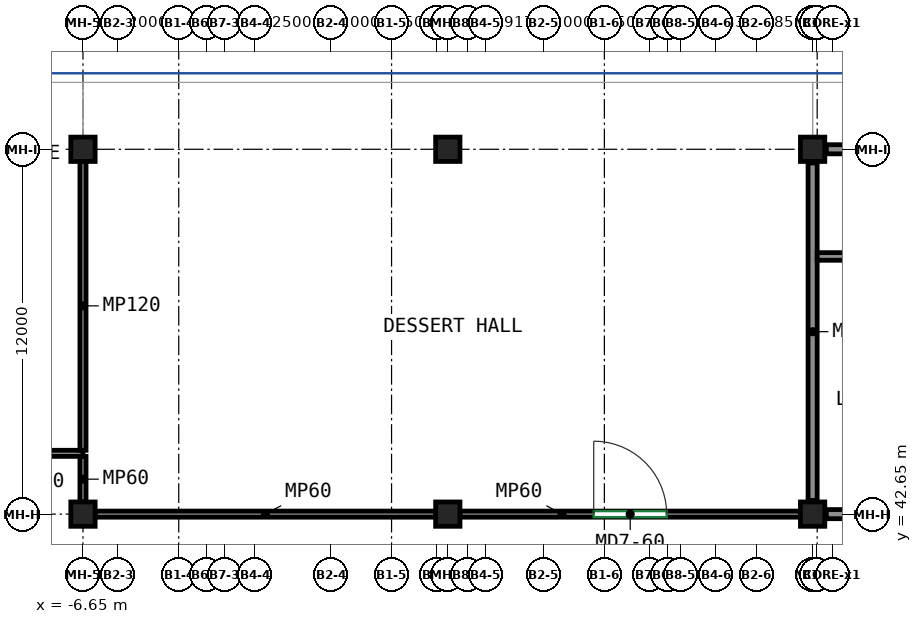
"""IFC4 building model, lengths in metres.
Left out: names, types, materials, properties, quantities, classifications, styles, units other than length and angle.
Written with IfcOpenShell. Run it as: python <this file> out.ifc"""

import sys

from ifc_helpers import new_model, si_unit, direction, frame, frame_2d, origin, origin_2d, place, context, subcontext, project, spatial, rectangle, extrude, source, transform, mapped, element, fill, save


model = new_model("IFC4")
c1 = context("Model", 3, precision=1e-05, world=origin(), true_north=direction((0.0, 1.0)))
c2 = subcontext(c1, "Body", "Model", "MODEL_VIEW")
j1 = project(units=[si_unit("LENGTHUNIT", "METRE"), si_unit("PLANEANGLEUNIT", "RADIAN")], contexts=[c1])
p1 = place(None, origin())
s1 = spatial("IfcSite", under=j1, at=p1, CompositionType="ELEMENT")
p2 = place(p1, origin())
s2 = spatial("IfcBuilding", under=s1, at=p2, CompositionType="ELEMENT")
p3 = place(p2, frame((0.0, 0.0, 9.0)))
s3 = spatial("IfcBuildingStorey", under=s2, at=p3, CompositionType="ELEMENT", Elevation=9.0)
m1 = source(origin(), c2, "Body", "SweptSolid", [
    extrude(rectangle(XDim=0.8, YDim=0.8, at=origin_2d()), origin(), (0.0, 0.0, 1.0), 4.1),
])
for number, where, z_axis, x_axis in (
    (1, (-6.65, 42.65, 0.0), (0.0, 0.0, 1.0), (1.0, 0.0, 0.0)),
    (2, (-6.65, 54.65, 0.0), (0.0, 0.0, 1.0), (1.0, 0.0, 0.0)),
    (3, (5.35, 42.65, 0.0), (0.0, 0.0, 1.0), (1.0, 0.0, 0.0)),
    (4, (5.35, 54.65, 0.0), (0.0, 0.0, 1.0), (1.0, 0.0, 0.0)),
    (5, (17.35, 42.65, 0.0), (0.0, 0.0, 1.0), (1.0, 0.0, 0.0)),
    (6, (17.35, 54.65, 0.0), (0.0, 0.0, 1.0), (1.0, 0.0, 0.0)),
):
    element("IfcColumn", number, at=place(p3, frame(where, z_axis=z_axis, x_axis=x_axis)), inside=s3, PredefinedType="COLUMN", context=c2, shape_type="MappedRepresentation", body=[
        mapped(m1, transform((0.0, 0.0, 0.0))),
    ])
m2 = source(origin(), c2, "Body", "SweptSolid", [
    extrude(rectangle(XDim=12.4, YDim=0.3, at=frame_2d((6.2, 0.0))), origin(), (0.0, 0.0, 1.0), 3.2),
])
p4 = place(p3, frame((30.2, 54.65, 0.0), z_axis=(0.0, 0.0, 1.0), x_axis=(-1.0, 0.0, 0.0)))
e7 = element("IfcWall", 7, at=p4, inside=s3, PredefinedType="SHEAR", context=c2, shape_type="MappedRepresentation", body=[
    mapped(m2, transform((0.0, 0.0, 0.0))),
])
p5 = place(p4, frame((5.7, 0.0, 0.0)))
e8 = element("IfcOpeningElement", 8, at=p5, cuts=e7, PredefinedType="OPENING", context=c2, shape_type="SweptSolid", body=[
    extrude(rectangle(XDim=1.0, YDim=2.1, at=frame_2d((0.5, 1.05))), frame((0.0, 0.16, 0.0), z_axis=(0.0, -1.0, 0.0), x_axis=(1.0, 0.0, 0.0)), (0.0, 0.0, 1.0), 0.32),
])
p6 = place(p3, frame((30.2, 42.65, 0.0), z_axis=(0.0, 0.0, 1.0), x_axis=(-1.0, 0.0, 0.0)))
e9 = element("IfcWall", 9, at=p6, inside=s3, PredefinedType="SHEAR", context=c2, shape_type="MappedRepresentation", body=[
    mapped(m2, transform((0.0, 0.0, 0.0))),
])
p7 = place(p6, frame((5.2, 0.0, 0.0)))
e10 = element("IfcOpeningElement", 10, at=p7, cuts=e9, PredefinedType="OPENING", context=c2, shape_type="SweptSolid", body=[
    extrude(rectangle(XDim=2.0, YDim=2.4, at=frame_2d((1.0, 1.2))), frame((0.0, 0.16, 0.0), z_axis=(0.0, -1.0, 0.0), x_axis=(1.0, 0.0, 0.0)), (0.0, 0.0, 1.0), 0.32),
])
m3 = source(origin(), c2, "Body", "SweptSolid", [
    extrude(rectangle(XDim=11.1, YDim=0.3, at=frame_2d((5.55, 0.0))), origin(), (0.0, 0.0, 1.0), 3.2),
])
p8 = place(p3, frame((17.35, 54.2, 0.0), z_axis=(0.0, 0.0, 1.0), x_axis=(0.0, -1.0, 0.0)))
e11 = element("IfcWall", 11, at=p8, inside=s3, PredefinedType="SHEAR", context=c2, shape_type="MappedRepresentation", body=[
    mapped(m3, transform((0.0, 0.0, 0.0))),
])
m4 = source(origin(), c2, "Body", "SweptSolid", [
    extrude(rectangle(XDim=4.15, YDim=0.25, at=frame_2d((2.075, 0.0))), origin(), (0.0, 0.0, 1.0), 4.1),
])
p9 = place(p3, frame((21.65, 51.125, 0.0), z_axis=(0.0, 0.0, 1.0), x_axis=(-1.0, 0.0, 0.0)))
e12 = element("IfcWall", 12, at=p9, inside=s3, PredefinedType="SHEAR", context=c2, shape_type="MappedRepresentation", body=[
    mapped(m4, transform((0.0, 0.0, 0.0))),
])
p10 = place(p9, frame((1.4, 0.0, 0.0)))
e13 = element("IfcOpeningElement", 13, at=p10, cuts=e12, PredefinedType="OPENING", context=c2, shape_type="SweptSolid", body=[
    extrude(rectangle(XDim=1.1, YDim=2.1, at=frame_2d((0.55, 1.05))), frame((0.0, 0.135, 0.0), z_axis=(0.0, -1.0, 0.0), x_axis=(1.0, 0.0, 0.0)), (0.0, 0.0, 1.0), 0.27),
])
m5 = source(origin(), c2, "Body", "SweptSolid", [
    extrude(rectangle(XDim=112.7, YDim=0.3, at=frame_2d((56.35, 0.0))), origin(), (0.0, 0.0, 1.0), 4.1),
])
p11 = place(p3, frame((-56.85, 57.0, 0.0), z_axis=(0.0, 0.0, 1.0), x_axis=(1.0, 0.0, 0.0)))
e14 = element("IfcWall", 14, at=p11, inside=s3, PredefinedType="SOLIDWALL", context=c2, shape_type="MappedRepresentation", body=[
    mapped(m5, transform((0.0, 0.0, 0.0))),
])
p12 = place(p11, frame((3.15, 0.0, 0.9)))
e15 = element("IfcOpeningElement", 15, at=p12, cuts=e14, PredefinedType="OPENING", context=c2, shape_type="SweptSolid", body=[
    extrude(rectangle(XDim=2.4, YDim=1.8, at=frame_2d((1.2, 0.9))), frame((0.0, 0.16, 0.0), z_axis=(0.0, -1.0, 0.0), x_axis=(1.0, 0.0, 0.0)), (0.0, 0.0, 1.0), 0.32),
])
p13 = place(p11, frame((7.15, 0.0, 0.9)))
e16 = element("IfcOpeningElement", 16, at=p13, cuts=e14, PredefinedType="OPENING", context=c2, shape_type="SweptSolid", body=[
    extrude(rectangle(XDim=2.4, YDim=1.8, at=frame_2d((1.2, 0.9))), frame((0.0, 0.16, 0.0), z_axis=(0.0, -1.0, 0.0), x_axis=(1.0, 0.0, 0.0)), (0.0, 0.0, 1.0), 0.32),
])
p14 = place(p11, frame((11.15, 0.0, 0.9)))
e17 = element("IfcOpeningElement", 17, at=p14, cuts=e14, PredefinedType="OPENING", context=c2, shape_type="SweptSolid", body=[
    extrude(rectangle(XDim=2.4, YDim=1.8, at=frame_2d((1.2, 0.9))), frame((0.0, 0.16, 0.0), z_axis=(0.0, -1.0, 0.0), x_axis=(1.0, 0.0, 0.0)), (0.0, 0.0, 1.0), 0.32),
])
p15 = place(p11, frame((15.15, 0.0, 0.9)))
e18 = element("IfcOpeningElement", 18, at=p15, cuts=e14, PredefinedType="OPENING", context=c2, shape_type="SweptSolid", body=[
    extrude(rectangle(XDim=2.4, YDim=1.8, at=frame_2d((1.2, 0.9))), frame((0.0, 0.16, 0.0), z_axis=(0.0, -1.0, 0.0), x_axis=(1.0, 0.0, 0.0)), (0.0, 0.0, 1.0), 0.32),
])
p16 = place(p11, frame((19.15, 0.0, 0.9)))
e19 = element("IfcOpeningElement", 19, at=p16, cuts=e14, PredefinedType="OPENING", context=c2, shape_type="SweptSolid", body=[
    extrude(rectangle(XDim=2.4, YDim=1.8, at=frame_2d((1.2, 0.9))), frame((0.0, 0.16, 0.0), z_axis=(0.0, -1.0, 0.0), x_axis=(1.0, 0.0, 0.0)), (0.0, 0.0, 1.0), 0.32),
])
p17 = place(p11, frame((23.15, 0.0, 0.9)))
e20 = element("IfcOpeningElement", 20, at=p17, cuts=e14, PredefinedType="OPENING", context=c2, shape_type="SweptSolid", body=[
    extrude(rectangle(XDim=2.4, YDim=1.8, at=frame_2d((1.2, 0.9))), frame((0.0, 0.16, 0.0), z_axis=(0.0, -1.0, 0.0), x_axis=(1.0, 0.0, 0.0)), (0.0, 0.0, 1.0), 0.32),
])
p18 = place(p11, frame((27.15, 0.0, 0.9)))
e21 = element("IfcOpeningElement", 21, at=p18, cuts=e14, PredefinedType="OPENING", context=c2, shape_type="SweptSolid", body=[
    extrude(rectangle(XDim=2.4, YDim=1.8, at=frame_2d((1.2, 0.9))), frame((0.0, 0.16, 0.0), z_axis=(0.0, -1.0, 0.0), x_axis=(1.0, 0.0, 0.0)), (0.0, 0.0, 1.0), 0.32),
])
p19 = place(p11, frame((31.15, 0.0, 0.9)))
e22 = element("IfcOpeningElement", 22, at=p19, cuts=e14, PredefinedType="OPENING", context=c2, shape_type="SweptSolid", body=[
    extrude(rectangle(XDim=2.4, YDim=1.8, at=frame_2d((1.2, 0.9))), frame((0.0, 0.16, 0.0), z_axis=(0.0, -1.0, 0.0), x_axis=(1.0, 0.0, 0.0)), (0.0, 0.0, 1.0), 0.32),
])
p20 = place(p11, frame((35.15, 0.0, 0.9)))
e23 = element("IfcOpeningElement", 23, at=p20, cuts=e14, PredefinedType="OPENING", context=c2, shape_type="SweptSolid", body=[
    extrude(rectangle(XDim=2.4, YDim=1.8, at=frame_2d((1.2, 0.9))), frame((0.0, 0.16, 0.0), z_axis=(0.0, -1.0, 0.0), x_axis=(1.0, 0.0, 0.0)), (0.0, 0.0, 1.0), 0.32),
])
p21 = place(p11, frame((43.15, 0.0, 0.9)))
e24 = element("IfcOpeningElement", 24, at=p21, cuts=e14, PredefinedType="OPENING", context=c2, shape_type="SweptSolid", body=[
    extrude(rectangle(XDim=2.4, YDim=1.8, at=frame_2d((1.2, 0.9))), frame((0.0, 0.16, 0.0), z_axis=(0.0, -1.0, 0.0), x_axis=(1.0, 0.0, 0.0)), (0.0, 0.0, 1.0), 0.32),
])
p22 = place(p11, frame((47.15, 0.0, 0.9)))
e25 = element("IfcOpeningElement", 25, at=p22, cuts=e14, PredefinedType="OPENING", context=c2, shape_type="SweptSolid", body=[
    extrude(rectangle(XDim=2.4, YDim=1.8, at=frame_2d((1.2, 0.9))), frame((0.0, 0.16, 0.0), z_axis=(0.0, -1.0, 0.0), x_axis=(1.0, 0.0, 0.0)), (0.0, 0.0, 1.0), 0.32),
])
p23 = place(p11, frame((51.15, 0.0, 0.9)))
e26 = element("IfcOpeningElement", 26, at=p23, cuts=e14, PredefinedType="OPENING", context=c2, shape_type="SweptSolid", body=[
    extrude(rectangle(XDim=2.4, YDim=1.8, at=frame_2d((1.2, 0.9))), frame((0.0, 0.16, 0.0), z_axis=(0.0, -1.0, 0.0), x_axis=(1.0, 0.0, 0.0)), (0.0, 0.0, 1.0), 0.32),
])
p24 = place(p11, frame((55.15, 0.0, 0.9)))
e27 = element("IfcOpeningElement", 27, at=p24, cuts=e14, PredefinedType="OPENING", context=c2, shape_type="SweptSolid", body=[
    extrude(rectangle(XDim=2.4, YDim=1.8, at=frame_2d((1.2, 0.9))), frame((0.0, 0.16, 0.0), z_axis=(0.0, -1.0, 0.0), x_axis=(1.0, 0.0, 0.0)), (0.0, 0.0, 1.0), 0.32),
])
p25 = place(p11, frame((59.15, 0.0, 0.9)))
e28 = element("IfcOpeningElement", 28, at=p25, cuts=e14, PredefinedType="OPENING", context=c2, shape_type="SweptSolid", body=[
    extrude(rectangle(XDim=2.4, YDim=1.8, at=frame_2d((1.2, 0.9))), frame((0.0, 0.16, 0.0), z_axis=(0.0, -1.0, 0.0), x_axis=(1.0, 0.0, 0.0)), (0.0, 0.0, 1.0), 0.32),
])
p26 = place(p11, frame((63.15, 0.0, 0.9)))
e29 = element("IfcOpeningElement", 29, at=p26, cuts=e14, PredefinedType="OPENING", context=c2, shape_type="SweptSolid", body=[
    extrude(rectangle(XDim=2.4, YDim=1.8, at=frame_2d((1.2, 0.9))), frame((0.0, 0.16, 0.0), z_axis=(0.0, -1.0, 0.0), x_axis=(1.0, 0.0, 0.0)), (0.0, 0.0, 1.0), 0.32),
])
p27 = place(p11, frame((67.15, 0.0, 0.9)))
e30 = element("IfcOpeningElement", 30, at=p27, cuts=e14, PredefinedType="OPENING", context=c2, shape_type="SweptSolid", body=[
    extrude(rectangle(XDim=2.4, YDim=1.8, at=frame_2d((1.2, 0.9))), frame((0.0, 0.16, 0.0), z_axis=(0.0, -1.0, 0.0), x_axis=(1.0, 0.0, 0.0)), (0.0, 0.0, 1.0), 0.32),
])
p28 = place(p11, frame((71.15, 0.0, 0.9)))
e31 = element("IfcOpeningElement", 31, at=p28, cuts=e14, PredefinedType="OPENING", context=c2, shape_type="SweptSolid", body=[
    extrude(rectangle(XDim=2.4, YDim=1.8, at=frame_2d((1.2, 0.9))), frame((0.0, 0.16, 0.0), z_axis=(0.0, -1.0, 0.0), x_axis=(1.0, 0.0, 0.0)), (0.0, 0.0, 1.0), 0.32),
])
p29 = place(p11, frame((75.15, 0.0, 0.9)))
e32 = element("IfcOpeningElement", 32, at=p29, cuts=e14, PredefinedType="OPENING", context=c2, shape_type="SweptSolid", body=[
    extrude(rectangle(XDim=2.4, YDim=1.8, at=frame_2d((1.2, 0.9))), frame((0.0, 0.16, 0.0), z_axis=(0.0, -1.0, 0.0), x_axis=(1.0, 0.0, 0.0)), (0.0, 0.0, 1.0), 0.32),
])
p30 = place(p11, frame((79.15, 0.0, 0.9)))
e33 = element("IfcOpeningElement", 33, at=p30, cuts=e14, PredefinedType="OPENING", context=c2, shape_type="SweptSolid", body=[
    extrude(rectangle(XDim=2.4, YDim=1.8, at=frame_2d((1.2, 0.9))), frame((0.0, 0.16, 0.0), z_axis=(0.0, -1.0, 0.0), x_axis=(1.0, 0.0, 0.0)), (0.0, 0.0, 1.0), 0.32),
])
p31 = place(p11, frame((83.15, 0.0, 0.9)))
e34 = element("IfcOpeningElement", 34, at=p31, cuts=e14, PredefinedType="OPENING", context=c2, shape_type="SweptSolid", body=[
    extrude(rectangle(XDim=2.4, YDim=1.8, at=frame_2d((1.2, 0.9))), frame((0.0, 0.16, 0.0), z_axis=(0.0, -1.0, 0.0), x_axis=(1.0, 0.0, 0.0)), (0.0, 0.0, 1.0), 0.32),
])
p32 = place(p11, frame((87.15, 0.0, 0.9)))
e35 = element("IfcOpeningElement", 35, at=p32, cuts=e14, PredefinedType="OPENING", context=c2, shape_type="SweptSolid", body=[
    extrude(rectangle(XDim=2.4, YDim=1.8, at=frame_2d((1.2, 0.9))), frame((0.0, 0.16, 0.0), z_axis=(0.0, -1.0, 0.0), x_axis=(1.0, 0.0, 0.0)), (0.0, 0.0, 1.0), 0.32),
])
p33 = place(p11, frame((91.15, 0.0, 0.9)))
e36 = element("IfcOpeningElement", 36, at=p33, cuts=e14, PredefinedType="OPENING", context=c2, shape_type="SweptSolid", body=[
    extrude(rectangle(XDim=2.4, YDim=1.8, at=frame_2d((1.2, 0.9))), frame((0.0, 0.16, 0.0), z_axis=(0.0, -1.0, 0.0), x_axis=(1.0, 0.0, 0.0)), (0.0, 0.0, 1.0), 0.32),
])
p34 = place(p11, frame((95.15, 0.0, 0.9)))
e37 = element("IfcOpeningElement", 37, at=p34, cuts=e14, PredefinedType="OPENING", context=c2, shape_type="SweptSolid", body=[
    extrude(rectangle(XDim=2.4, YDim=1.8, at=frame_2d((1.2, 0.9))), frame((0.0, 0.16, 0.0), z_axis=(0.0, -1.0, 0.0), x_axis=(1.0, 0.0, 0.0)), (0.0, 0.0, 1.0), 0.32),
])
p35 = place(p11, frame((103.15, 0.0, 0.9)))
e38 = element("IfcOpeningElement", 38, at=p35, cuts=e14, PredefinedType="OPENING", context=c2, shape_type="SweptSolid", body=[
    extrude(rectangle(XDim=2.4, YDim=1.8, at=frame_2d((1.2, 0.9))), frame((0.0, 0.16, 0.0), z_axis=(0.0, -1.0, 0.0), x_axis=(1.0, 0.0, 0.0)), (0.0, 0.0, 1.0), 0.32),
])
p36 = place(p11, frame((107.15, 0.0, 0.9)))
e39 = element("IfcOpeningElement", 39, at=p36, cuts=e14, PredefinedType="OPENING", context=c2, shape_type="SweptSolid", body=[
    extrude(rectangle(XDim=2.4, YDim=1.8, at=frame_2d((1.2, 0.9))), frame((0.0, 0.16, 0.0), z_axis=(0.0, -1.0, 0.0), x_axis=(1.0, 0.0, 0.0)), (0.0, 0.0, 1.0), 0.32),
])
m6 = source(origin(), c2, "Body", "SweptSolid", [
    extrude(rectangle(XDim=3.9, YDim=0.2, at=frame_2d((1.95, 0.0))), origin(), (0.0, 0.0, 1.0), 3.2),
])
p37 = place(p3, frame((-10.55, 44.65, 0.0), z_axis=(0.0, 0.0, 1.0), x_axis=(1.0, 0.0, 0.0)))
e40 = element("IfcWall", 40, at=p37, inside=s3, PredefinedType="PARTITIONING", context=c2, shape_type="MappedRepresentation", body=[
    mapped(m6, transform((0.0, 0.0, 0.0))),
])
p38 = place(p37, frame((1.35, 0.0, 0.0)))
e41 = element("IfcOpeningElement", 41, at=p38, cuts=e40, PredefinedType="OPENING", context=c2, shape_type="SweptSolid", body=[
    extrude(rectangle(XDim=1.2, YDim=2.1, at=frame_2d((0.6, 1.05))), frame((0.0, 0.11, 0.0), z_axis=(0.0, -1.0, 0.0), x_axis=(1.0, 0.0, 0.0)), (0.0, 0.0, 1.0), 0.22),
])
m7 = source(origin(), c2, "Body", "SweptSolid", [
    extrude(rectangle(XDim=1.5, YDim=0.2, at=frame_2d((0.75, 0.0))), origin(), (0.0, 0.0, 1.0), 3.2),
])
p39 = place(p3, frame((-6.65, 44.55, 0.0), z_axis=(0.0, 0.0, 1.0), x_axis=(0.0, -1.0, 0.0)))
e42 = element("IfcWall", 42, at=p39, inside=s3, PredefinedType="PARTITIONING", context=c2, shape_type="MappedRepresentation", body=[
    mapped(m7, transform((0.0, 0.0, 0.0))),
])
m8 = source(origin(), c2, "Body", "SweptSolid", [
    extrude(rectangle(XDim=9.5, YDim=0.2, at=frame_2d((4.75, 0.0))), origin(), (0.0, 0.0, 1.0), 3.2),
])
p40 = place(p3, frame((-6.65, 54.25, 0.0), z_axis=(0.0, 0.0, 1.0), x_axis=(0.0, -1.0, 0.0)))
e43 = element("IfcWall", 43, at=p40, inside=s3, PredefinedType="PARTITIONING", context=c2, shape_type="MappedRepresentation", body=[
    mapped(m8, transform((0.0, 0.0, 0.0))),
])
m9 = source(origin(), c2, "Body", "SweptSolid", [
    extrude(rectangle(XDim=1.8, YDim=0.2, at=frame_2d((0.9, 0.0))), origin(), (0.0, 0.0, 1.0), 4.1),
])
p41 = place(p3, frame((-6.65, 56.85, 0.0), z_axis=(0.0, 0.0, 1.0), x_axis=(0.0, -1.0, 0.0)))
e44 = element("IfcWall", 44, at=p41, inside=s3, PredefinedType="PARTITIONING", context=c2, shape_type="MappedRepresentation", body=[
    mapped(m9, transform((0.0, 0.0, 0.0))),
])
m10 = source(origin(), c2, "Body", "SweptSolid", [
    extrude(rectangle(XDim=11.2, YDim=0.2, at=frame_2d((5.6, 0.0))), origin(), (0.0, 0.0, 1.0), 3.2),
])
p42 = place(p3, frame((-6.25, 42.65, 0.0), z_axis=(0.0, 0.0, 1.0), x_axis=(1.0, 0.0, 0.0)))
e45 = element("IfcWall", 45, at=p42, inside=s3, PredefinedType="PARTITIONING", context=c2, shape_type="MappedRepresentation", body=[
    mapped(m10, transform((0.0, 0.0, 0.0))),
])
p43 = place(p3, frame((5.75, 42.65, 0.0), z_axis=(0.0, 0.0, 1.0), x_axis=(1.0, 0.0, 0.0)))
e46 = element("IfcWall", 46, at=p43, inside=s3, PredefinedType="PARTITIONING", context=c2, shape_type="MappedRepresentation", body=[
    mapped(m10, transform((0.0, 0.0, 0.0))),
])
p44 = place(p43, frame((4.4, 0.0, 0.0)))
e47 = element("IfcOpeningElement", 47, at=p44, cuts=e46, PredefinedType="OPENING", context=c2, shape_type="SweptSolid", body=[
    extrude(rectangle(XDim=2.4, YDim=2.4, at=frame_2d((1.2, 1.2))), frame((0.0, 0.11, 0.0), z_axis=(0.0, -1.0, 0.0), x_axis=(1.0, 0.0, 0.0)), (0.0, 0.0, 1.0), 0.22),
])
p45 = place(p3, frame((17.35, 56.85, 0.0), z_axis=(0.0, 0.0, 1.0), x_axis=(0.0, -1.0, 0.0)))
e48 = element("IfcWall", 48, at=p45, inside=s3, PredefinedType="PARTITIONING", context=c2, shape_type="MappedRepresentation", body=[
    mapped(m9, transform((0.0, 0.0, 0.0))),
])
p46 = place(p22, origin())
e49 = element("IfcWindow", 49, at=p46, inside=s3, PartitioningType="SINGLE_PANEL", PredefinedType="WINDOW", context=c2, shape_type="SweptSolid", body=[
    extrude(rectangle(XDim=2.4, YDim=1.8, at=frame_2d((1.2, 0.9))), frame((0.0, 0.03, 0.0), z_axis=(0.0, -1.0, 0.0), x_axis=(1.0, 0.0, 0.0)), (0.0, 0.0, 1.0), 0.06),
])
fill(e25, e49)
p47 = place(p23, origin())
e50 = element("IfcWindow", 50, at=p47, inside=s3, PartitioningType="SINGLE_PANEL", PredefinedType="WINDOW", context=c2, shape_type="SweptSolid", body=[
    extrude(rectangle(XDim=2.4, YDim=1.8, at=frame_2d((1.2, 0.9))), frame((0.0, 0.03, 0.0), z_axis=(0.0, -1.0, 0.0), x_axis=(1.0, 0.0, 0.0)), (0.0, 0.0, 1.0), 0.06),
])
fill(e26, e50)
p48 = place(p24, origin())
e51 = element("IfcWindow", 51, at=p48, inside=s3, PartitioningType="SINGLE_PANEL", PredefinedType="WINDOW", context=c2, shape_type="SweptSolid", body=[
    extrude(rectangle(XDim=2.4, YDim=1.8, at=frame_2d((1.2, 0.9))), frame((0.0, 0.03, 0.0), z_axis=(0.0, -1.0, 0.0), x_axis=(1.0, 0.0, 0.0)), (0.0, 0.0, 1.0), 0.06),
])
fill(e27, e51)
p49 = place(p25, origin())
e52 = element("IfcWindow", 52, at=p49, inside=s3, PartitioningType="SINGLE_PANEL", PredefinedType="WINDOW", context=c2, shape_type="SweptSolid", body=[
    extrude(rectangle(XDim=2.4, YDim=1.8, at=frame_2d((1.2, 0.9))), frame((0.0, 0.03, 0.0), z_axis=(0.0, -1.0, 0.0), x_axis=(1.0, 0.0, 0.0)), (0.0, 0.0, 1.0), 0.06),
])
fill(e28, e52)
p50 = place(p26, origin())
e53 = element("IfcWindow", 53, at=p50, inside=s3, PartitioningType="SINGLE_PANEL", PredefinedType="WINDOW", context=c2, shape_type="SweptSolid", body=[
    extrude(rectangle(XDim=2.4, YDim=1.8, at=frame_2d((1.2, 0.9))), frame((0.0, 0.03, 0.0), z_axis=(0.0, -1.0, 0.0), x_axis=(1.0, 0.0, 0.0)), (0.0, 0.0, 1.0), 0.06),
])
fill(e29, e53)
p51 = place(p27, origin())
e54 = element("IfcWindow", 54, at=p51, inside=s3, PartitioningType="SINGLE_PANEL", PredefinedType="WINDOW", context=c2, shape_type="SweptSolid", body=[
    extrude(rectangle(XDim=2.4, YDim=1.8, at=frame_2d((1.2, 0.9))), frame((0.0, 0.03, 0.0), z_axis=(0.0, -1.0, 0.0), x_axis=(1.0, 0.0, 0.0)), (0.0, 0.0, 1.0), 0.06),
])
fill(e30, e54)
p52 = place(p28, origin())
e55 = element("IfcWindow", 55, at=p52, inside=s3, PartitioningType="SINGLE_PANEL", PredefinedType="WINDOW", context=c2, shape_type="SweptSolid", body=[
    extrude(rectangle(XDim=2.4, YDim=1.8, at=frame_2d((1.2, 0.9))), frame((0.0, 0.03, 0.0), z_axis=(0.0, -1.0, 0.0), x_axis=(1.0, 0.0, 0.0)), (0.0, 0.0, 1.0), 0.06),
])
fill(e31, e55)
p53 = place(p29, origin())
e56 = element("IfcWindow", 56, at=p53, inside=s3, PartitioningType="SINGLE_PANEL", PredefinedType="WINDOW", context=c2, shape_type="SweptSolid", body=[
    extrude(rectangle(XDim=2.4, YDim=1.8, at=frame_2d((1.2, 0.9))), frame((0.0, 0.03, 0.0), z_axis=(0.0, -1.0, 0.0), x_axis=(1.0, 0.0, 0.0)), (0.0, 0.0, 1.0), 0.06),
])
fill(e32, e56)
p54 = place(p44, origin())
e57 = element("IfcDoor", 57, at=p54, inside=s3, OperationType="DOUBLE_DOOR_SINGLE_SWING", PredefinedType="DOOR", context=c2, shape_type="SweptSolid", body=[
    extrude(rectangle(XDim=2.4, YDim=2.4, at=frame_2d((1.2, 1.2))), frame((0.0, 0.025, 0.0), z_axis=(0.0, -1.0, 0.0), x_axis=(1.0, 0.0, 0.0)), (0.0, 0.0, 1.0), 0.05),
])
fill(e47, e57)
save(model, sys.argv[1])
